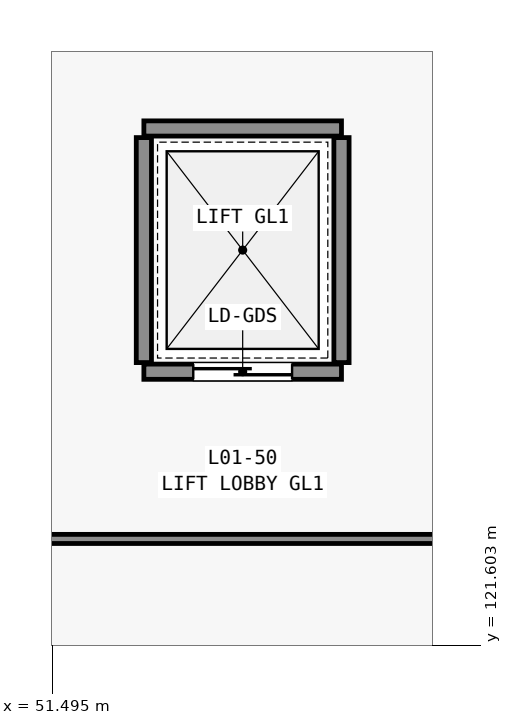
"""IFC4 building model, lengths in metres.
Left out: names, types, materials, properties, quantities, classifications, styles, units other than length and angle.
Written with IfcOpenShell. Run it as: python <this file> out.ifc"""

import sys

from ifc_helpers import new_model, si_unit, direction, frame, frame_2d, origin, place, context, subcontext, project, spatial, rectangle, extrude, element, fill, save


model = new_model("IFC4")
c1 = context("Model", 3, precision=1e-05, world=origin(), true_north=direction((0.0, 1.0)))
c2 = subcontext(c1, "Body", "Model", "MODEL_VIEW")
j1 = project(units=[si_unit("LENGTHUNIT", "METRE"), si_unit("PLANEANGLEUNIT", "RADIAN")], contexts=[c1])
p1 = place(None, origin())
s1 = spatial("IfcSite", under=j1, at=p1, CompositionType="ELEMENT")
p2 = place(p1, origin())
s2 = spatial("IfcBuilding", under=s1, at=p2, CompositionType="ELEMENT")
p3 = place(p2, frame((0.0, 0.0, 6.0)))
s3 = spatial("IfcBuildingStorey", under=s2, at=p3, CompositionType="ELEMENT", Elevation=6.0)
p4 = place(p3, frame((52.7, 125.2, 0.0), z_axis=(0.0, 0.0, 1.0), x_axis=(1.0, 0.0, 0.0)))
e1 = element("IfcWall", 1, at=p4, inside=s3, PredefinedType="STANDARD", context=c2, shape_type="SweptSolid", body=[
    extrude(rectangle(XDim=2.6, YDim=0.2, at=frame_2d((1.3, 0.0))), origin(), (0.0, 0.0, 1.0), 5.04),
])
p5 = place(p4, frame((0.65, 0.0, 0.0)))
e2 = element("IfcOpeningElement", 2, at=p5, cuts=e1, PredefinedType="OPENING", context=c2, shape_type="SweptSolid", body=[
    extrude(rectangle(XDim=1.3, YDim=2.15, at=frame_2d((0.65, 1.075))), frame((0.0, 0.11, 0.0), z_axis=(0.0, -1.0, 0.0), x_axis=(1.0, 0.0, 0.0)), (0.0, 0.0, 1.0), 0.22),
])
p6 = place(p3, frame((52.7, 128.4, 0.0), z_axis=(0.0, 0.0, 1.0), x_axis=(1.0, 0.0, 0.0)))
e3 = element("IfcWall", 3, at=p6, inside=s3, PredefinedType="STANDARD", context=c2, shape_type="SweptSolid", body=[
    extrude(rectangle(XDim=2.6, YDim=0.2, at=frame_2d((1.3, 0.0))), origin(), (0.0, 0.0, 1.0), 5.04),
])
for number, where, z_axis, x_axis in (
    (4, (52.7, 125.32, 0.0), (0.0, 0.0, 1.0), (0.0, 1.0, 0.0)),
    (5, (55.3, 125.32, 0.0), (0.0, 0.0, 1.0), (0.0, 1.0, 0.0)),
):
    element("IfcWall", number, at=place(p3, frame(where, z_axis=z_axis, x_axis=x_axis)), inside=s3, PredefinedType="STANDARD", context=c2, shape_type="SweptSolid", body=[
        extrude(rectangle(XDim=2.96, YDim=0.2, at=frame_2d((1.48, 0.0))), origin(), (0.0, 0.0, 1.0), 5.04),
    ])
p7 = place(p3, frame((41.5, 123.0, 0.0), z_axis=(0.0, 0.0, 1.0), x_axis=(1.0, 0.0, 0.0)))
e6 = element("IfcWall", 6, at=p7, inside=s3, PredefinedType="PARTITIONING", context=c2, shape_type="SweptSolid", body=[
    extrude(rectangle(XDim=29.0, YDim=0.12, at=frame_2d((14.5, 0.0))), origin(), (0.0, 0.0, 1.0), 4.428),
])
p8 = place(p5, origin())
e7 = element("IfcDoor", 7, at=p8, inside=s3, OperationType="SLIDING_TO_LEFT", PredefinedType="DOOR", context=c2, shape_type="SweptSolid", body=[
    extrude(rectangle(XDim=1.3, YDim=2.15, at=frame_2d((0.65, 1.075))), frame((0.0, 0.025, 0.0), z_axis=(0.0, -1.0, 0.0), x_axis=(1.0, 0.0, 0.0)), (0.0, 0.0, 1.0), 0.05),
])
fill(e2, e7)
save(model, sys.argv[1])
